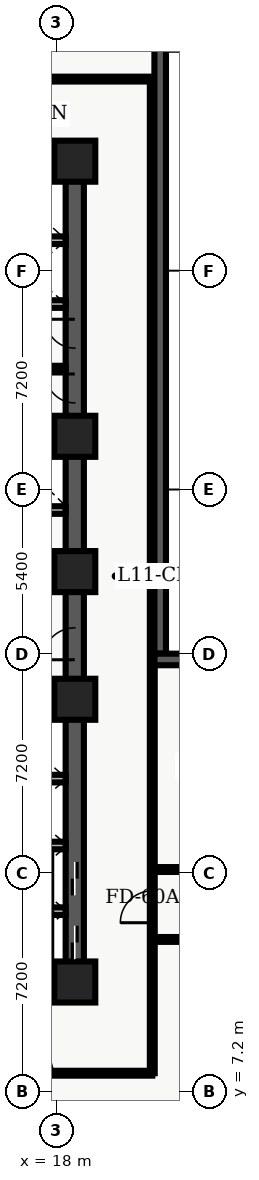
"""IFC4 building model, lengths in metres.
Left out: names, types, materials, properties, quantities, classifications, styles, units other than length and angle.
Written with IfcOpenShell. Run it as: python <this file> out.ifc"""

import sys

from ifc_helpers import new_model, entity, si_unit, converted_unit, direction, frame, origin_with_axes, origin_2d_with_axis, place, context, subcontext, project, spatial, polyline, rectangle, outline, extrude, element, fill, save


model = new_model("IFC4")
c1 = context("Model", 3, precision=1e-05, world=origin_with_axes(), true_north=direction((0.0, 1.0)))
c2 = subcontext(c1, "Body", "Model", "MODEL_VIEW")
j1 = project(units=[si_unit("LENGTHUNIT", "METRE"), converted_unit("PLANEANGLEUNIT", "DEGREE", entity("IfcPlaneAngleMeasure", 0.017), si_unit("PLANEANGLEUNIT", "RADIAN"), dimensions=[0, 0, 0, 0, 0, 0, 0])], contexts=[c1])
p1 = place(None, origin_with_axes())
s1 = spatial("IfcSite", under=j1, at=p1, CompositionType="ELEMENT")
p2 = place(p1, origin_with_axes())
s2 = spatial("IfcBuilding", under=s1, at=p2, CompositionType="ELEMENT")
p3 = place(p2, frame((0.0, 0.0, 48.3), z_axis=(0.0, 0.0, 1.0), x_axis=(1.0, 0.0, 0.0)))
s3 = spatial("IfcBuildingStorey", under=s2, at=p3, CompositionType="ELEMENT", Elevation=48.3)
p4 = place(p3, frame((11.4, 10.8, 0.0), z_axis=(0.0, 0.0, 1.0), x_axis=(1.0, 0.0, 0.0)))
e1 = element("IfcWall", 1, at=p4, inside=s3, PredefinedType="SHEAR", context=c2, shape_type="SweptSolid", body=[
    extrude(outline(polyline([(0.0, -0.3), (7.2, -0.3), (7.2, 0.3), (0.0, 0.3), (0.0, -0.3)])), origin_with_axes(), (0.0, 0.0, 1.0), 3.66),
])
p5 = place(p4, frame((2.625, 0.0, 0.0), z_axis=(0.0, 0.0, 1.0), x_axis=(1.0, 0.0, 0.0)))
e2 = element("IfcOpeningElement", 2, at=p5, cuts=e1, PredefinedType="OPENING", context=c2, shape_type="SweptSolid", body=[
    extrude(rectangle(XDim=1.05, YDim=0.62, at=origin_2d_with_axis()), origin_with_axes(), (0.0, 0.0, 1.0), 2.15),
])
p6 = place(p3, frame((11.4, 37.8, 0.0), z_axis=(0.0, 0.0, 1.0), x_axis=(1.0, 0.0, 0.0)))
e3 = element("IfcWall", 3, at=p6, inside=s3, PredefinedType="SHEAR", context=c2, shape_type="SweptSolid", body=[
    extrude(outline(polyline([(0.0, -0.3), (7.2, -0.3), (7.2, 0.3), (0.0, 0.3), (0.0, -0.3)])), origin_with_axes(), (0.0, 0.0, 1.0), 3.66),
])
p7 = place(p6, frame((2.625, 0.0, 0.0), z_axis=(0.0, 0.0, 1.0), x_axis=(1.0, 0.0, 0.0)))
e4 = element("IfcOpeningElement", 4, at=p7, cuts=e3, PredefinedType="OPENING", context=c2, shape_type="SweptSolid", body=[
    extrude(rectangle(XDim=1.05, YDim=0.62, at=origin_2d_with_axis()), origin_with_axes(), (0.0, 0.0, 1.0), 2.15),
])
p8 = place(p3, frame((18.6, 10.8, 0.0), z_axis=(0.0, 0.0, 1.0), x_axis=(0.0, 1.0, 0.0)))
e5 = element("IfcWall", 5, at=p8, inside=s3, PredefinedType="SHEAR", context=c2, shape_type="SweptSolid", body=[
    extrude(outline(polyline([(0.0, -0.3), (13.5, -0.3), (13.5, 0.3), (0.0, 0.3), (0.0, -0.3)])), origin_with_axes(), (0.0, 0.0, 1.0), 3.66),
])
p9 = place(p8, frame((1.3, 0.0, 0.0), z_axis=(0.0, 0.0, 1.0), x_axis=(1.0, 0.0, 0.0)))
e6 = element("IfcOpeningElement", 6, at=p9, cuts=e5, PredefinedType="OPENING", context=c2, shape_type="SweptSolid", body=[
    extrude(rectangle(XDim=1.1, YDim=0.62, at=origin_2d_with_axis()), origin_with_axes(), (0.0, 0.0, 1.0), 2.15),
])
p10 = place(p8, frame((3.4, 0.0, 0.0), z_axis=(0.0, 0.0, 1.0), x_axis=(1.0, 0.0, 0.0)))
e7 = element("IfcOpeningElement", 7, at=p10, cuts=e5, PredefinedType="OPENING", context=c2, shape_type="SweptSolid", body=[
    extrude(rectangle(XDim=1.1, YDim=0.62, at=origin_2d_with_axis()), origin_with_axes(), (0.0, 0.0, 1.0), 2.15),
])
p11 = place(p8, frame((11.125, 0.0, 0.0), z_axis=(0.0, 0.0, 1.0), x_axis=(1.0, 0.0, 0.0)))
e8 = element("IfcOpeningElement", 8, at=p11, cuts=e5, PredefinedType="OPENING", context=c2, shape_type="SweptSolid", body=[
    extrude(rectangle(XDim=1.05, YDim=0.62, at=origin_2d_with_axis()), origin_with_axes(), (0.0, 0.0, 1.0), 2.15),
])
p12 = place(p3, frame((18.6, 24.3, 0.0), z_axis=(0.0, 0.0, 1.0), x_axis=(0.0, 1.0, 0.0)))
e9 = element("IfcWall", 9, at=p12, inside=s3, PredefinedType="SHEAR", context=c2, shape_type="SweptSolid", body=[
    extrude(outline(polyline([(0.0, -0.3), (13.5, -0.3), (13.5, 0.3), (0.0, 0.3), (0.0, -0.3)])), origin_with_axes(), (0.0, 0.0, 1.0), 3.66),
])
p13 = place(p12, frame((6.025, 0.0, 0.0), z_axis=(0.0, 0.0, 1.0), x_axis=(1.0, 0.0, 0.0)))
e10 = element("IfcOpeningElement", 10, at=p13, cuts=e9, PredefinedType="OPENING", context=c2, shape_type="SweptSolid", body=[
    extrude(rectangle(XDim=0.95, YDim=0.62, at=origin_2d_with_axis()), origin_with_axes(), (0.0, 0.0, 1.0), 2.15),
])
p14 = place(p12, frame((7.825, 0.0, 0.0), z_axis=(0.0, 0.0, 1.0), x_axis=(1.0, 0.0, 0.0)))
e11 = element("IfcOpeningElement", 11, at=p14, cuts=e9, PredefinedType="OPENING", context=c2, shape_type="SweptSolid", body=[
    extrude(rectangle(XDim=0.95, YDim=0.62, at=origin_2d_with_axis()), origin_with_axes(), (0.0, 0.0, 1.0), 2.15),
])
for number, where, z_axis, x_axis in (
    (12, (11.7, 19.825, 0.0), (0.0, 0.0, 1.0), (1.0, 0.0, 0.0)),
    (13, (11.7, 28.775, 0.0), (0.0, 0.0, 1.0), (1.0, 0.0, 0.0)),
):
    element("IfcWall", number, at=place(p3, frame(where, z_axis=z_axis, x_axis=x_axis)), inside=s3, PredefinedType="SHEAR", context=c2, shape_type="SweptSolid", body=[
        extrude(outline(polyline([(0.0, -0.125), (6.6, -0.125), (6.6, 0.125), (0.0, 0.125), (0.0, -0.125)])), origin_with_axes(), (0.0, 0.0, 1.0), 3.66),
    ])
p15 = place(p3, frame((11.7, 24.1, 0.0), z_axis=(0.0, 0.0, 1.0), x_axis=(1.0, 0.0, 0.0)))
e14 = element("IfcWall", 14, at=p15, inside=s3, PredefinedType="SOLIDWALL", context=c2, shape_type="SweptSolid", body=[
    extrude(outline(polyline([(0.0, -0.125), (6.6, -0.125), (6.6, 0.125), (0.0, 0.125), (0.0, -0.125)])), origin_with_axes(), (0.0, 0.0, 1.0), 2.7),
])
p16 = place(p15, frame((3.6, 0.0, 0.0), z_axis=(0.0, 0.0, 1.0), x_axis=(1.0, 0.0, 0.0)))
e15 = element("IfcOpeningElement", 15, at=p16, cuts=e14, PredefinedType="OPENING", context=c2, shape_type="SweptSolid", body=[
    extrude(rectangle(XDim=0.9, YDim=0.27, at=origin_2d_with_axis()), origin_with_axes(), (0.0, 0.0, 1.0), 2.15),
])
p17 = place(p15, frame((5.65, 0.0, 0.0), z_axis=(0.0, 0.0, 1.0), x_axis=(1.0, 0.0, 0.0)))
e16 = element("IfcOpeningElement", 16, at=p17, cuts=e14, PredefinedType="OPENING", context=c2, shape_type="SweptSolid", body=[
    extrude(rectangle(XDim=0.9, YDim=0.27, at=origin_2d_with_axis()), origin_with_axes(), (0.0, 0.0, 1.0), 2.15),
])
p18 = place(p3, frame((11.7, 26.325, 0.0), z_axis=(0.0, 0.0, 1.0), x_axis=(1.0, 0.0, 0.0)))
e17 = element("IfcWall", 17, at=p18, inside=s3, PredefinedType="SOLIDWALL", context=c2, shape_type="SweptSolid", body=[
    extrude(outline(polyline([(0.0, -0.125), (6.6, -0.125), (6.6, 0.125), (0.0, 0.125), (0.0, -0.125)])), origin_with_axes(), (0.0, 0.0, 1.0), 2.7),
])
p19 = place(p18, frame((3.5, 0.0, 0.0), z_axis=(0.0, 0.0, 1.0), x_axis=(1.0, 0.0, 0.0)))
e18 = element("IfcOpeningElement", 18, at=p19, cuts=e17, PredefinedType="OPENING", context=c2, shape_type="SweptSolid", body=[
    extrude(rectangle(XDim=0.9, YDim=0.27, at=origin_2d_with_axis()), origin_with_axes(), (0.0, 0.0, 1.0), 2.15),
])
for number, where, z_axis, x_axis in (
    (19, (18.6, 10.8, 0.0), (0.0, 0.0, 1.0), (1.0, 0.0, 0.0)),
    (20, (18.6, 20.1, 0.0), (0.0, 0.0, 1.0), (1.0, 0.0, 0.0)),
    (21, (18.6, 24.3, 0.0), (0.0, 0.0, 1.0), (1.0, 0.0, 0.0)),
    (22, (18.6, 28.75, 0.0), (0.0, 0.0, 1.0), (1.0, 0.0, 0.0)),
    (23, (18.6, 37.8, 0.0), (0.0, 0.0, 1.0), (1.0, 0.0, 0.0)),
):
    element("IfcColumn", number, at=place(p3, frame(where, z_axis=z_axis, x_axis=x_axis)), inside=s3, PredefinedType="COLUMN", context=c2, shape_type="SweptSolid", body=[
        extrude(rectangle(XDim=1.35, YDim=1.35, at=origin_2d_with_axis()), origin_with_axes(), (0.0, 0.0, 1.0), 3.9),
    ])
for number, where, z_axis, x_axis in (
    (24, (15.84, 13.13, 0.0), (0.0, 0.0, 1.0), (1.0, 0.0, 0.0)),
    (25, (15.84, 15.29, 0.0), (0.0, 0.0, 1.0), (1.0, 0.0, 0.0)),
    (26, (15.84, 17.49, 0.0), (0.0, 0.0, 1.0), (1.0, 0.0, 0.0)),
    (27, (15.84, 33.1, 0.0), (0.0, 0.0, 1.0), (1.0, 0.0, 0.0)),
    (28, (15.84, 35.2, 0.0), (0.0, 0.0, 1.0), (1.0, 0.0, 0.0)),
):
    element("IfcWall", number, at=place(p3, frame(where, z_axis=z_axis, x_axis=x_axis)), inside=s3, PredefinedType="SOLIDWALL", context=c2, shape_type="SweptSolid", body=[
        extrude(outline(polyline([(0.0, -0.125), (2.46, -0.125), (2.46, 0.125), (0.0, 0.125), (0.0, -0.125)])), origin_with_axes(), (0.0, 0.0, 1.0), 2.7),
    ])
p20 = place(p3, frame((15.84, 31.0, 0.0), z_axis=(0.0, 0.0, 1.0), x_axis=(1.0, 0.0, 0.0)))
e29 = element("IfcWall", 29, at=p20, inside=s3, PredefinedType="PARTITIONING", context=c2, shape_type="SweptSolid", body=[
    extrude(outline(polyline([(0.0, -0.07), (2.46, -0.07), (2.46, 0.07), (0.0, 0.07), (0.0, -0.07)])), origin_with_axes(), (0.0, 0.0, 1.0), 2.7),
])
p21 = place(p3, frame((2.6, 7.8, 0.0), z_axis=(0.0, 0.0, 1.0), x_axis=(1.0, 0.0, 0.0)))
e30 = element("IfcWall", 30, at=p21, inside=s3, PredefinedType="PARTITIONING", context=c2, shape_type="SweptSolid", body=[
    extrude(outline(polyline([(0.0, -0.08), (18.55, -0.08), (18.55, 0.08), (0.0, 0.08), (0.0, -0.08)])), origin_with_axes(), (0.0, 0.0, 1.0), 2.7),
])
p22 = place(p21, frame((2.225, 0.0, 0.0), z_axis=(0.0, 0.0, 1.0), x_axis=(1.0, 0.0, 0.0)))
e31 = element("IfcOpeningElement", 31, at=p22, cuts=e30, PredefinedType="OPENING", context=c2, shape_type="SweptSolid", body=[
    extrude(rectangle(XDim=1.0, YDim=0.18, at=origin_2d_with_axis()), origin_with_axes(), (0.0, 0.0, 1.0), 2.15),
])
p23 = place(p21, frame((8.043, 0.0, 0.0), z_axis=(0.0, 0.0, 1.0), x_axis=(1.0, 0.0, 0.0)))
e32 = element("IfcOpeningElement", 32, at=p23, cuts=e30, PredefinedType="OPENING", context=c2, shape_type="SweptSolid", body=[
    extrude(rectangle(XDim=1.0, YDim=0.18, at=origin_2d_with_axis()), origin_with_axes(), (0.0, 0.0, 1.0), 2.15),
])
p24 = place(p21, frame((14.784, 0.0, 0.0), z_axis=(0.0, 0.0, 1.0), x_axis=(1.0, 0.0, 0.0)))
e33 = element("IfcOpeningElement", 33, at=p24, cuts=e30, PredefinedType="OPENING", context=c2, shape_type="SweptSolid", body=[
    extrude(rectangle(XDim=1.0, YDim=0.18, at=origin_2d_with_axis()), origin_with_axes(), (0.0, 0.0, 1.0), 2.15),
])
p25 = place(p3, frame((2.6, 40.5, 0.0), z_axis=(0.0, 0.0, 1.0), x_axis=(1.0, 0.0, 0.0)))
e34 = element("IfcWall", 34, at=p25, inside=s3, PredefinedType="PARTITIONING", context=c2, shape_type="SweptSolid", body=[
    extrude(outline(polyline([(0.0, -0.08), (18.65, -0.08), (18.65, 0.08), (0.0, 0.08), (0.0, -0.08)])), origin_with_axes(), (0.0, 0.0, 1.0), 2.7),
])
p26 = place(p25, frame((5.275, 0.0, 0.0), z_axis=(0.0, 0.0, 1.0), x_axis=(1.0, 0.0, 0.0)))
e35 = element("IfcOpeningElement", 35, at=p26, cuts=e34, PredefinedType="OPENING", context=c2, shape_type="SweptSolid", body=[
    extrude(rectangle(XDim=1.0, YDim=0.18, at=origin_2d_with_axis()), origin_with_axes(), (0.0, 0.0, 1.0), 2.15),
])
p27 = place(p25, frame((12.61, 0.0, 0.0), z_axis=(0.0, 0.0, 1.0), x_axis=(1.0, 0.0, 0.0)))
e36 = element("IfcOpeningElement", 36, at=p27, cuts=e34, PredefinedType="OPENING", context=c2, shape_type="SweptSolid", body=[
    extrude(rectangle(XDim=1.2, YDim=0.18, at=origin_2d_with_axis()), origin_with_axes(), (0.0, 0.0, 1.0), 2.2),
])
p28 = place(p3, frame((21.15, 7.8, 0.0), z_axis=(0.0, 0.0, 1.0), x_axis=(0.0, 1.0, 0.0)))
e37 = element("IfcWall", 37, at=p28, inside=s3, PredefinedType="PARTITIONING", context=c2, shape_type="SweptSolid", body=[
    extrude(outline(polyline([(0.0, -0.08), (32.7, -0.08), (32.7, 0.08), (0.0, 0.08), (0.0, -0.08)])), origin_with_axes(), (0.0, 0.0, 1.0), 2.7),
])
p29 = place(p28, frame((5.475, 0.0, 0.0), z_axis=(0.0, 0.0, 1.0), x_axis=(1.0, 0.0, 0.0)))
e38 = element("IfcOpeningElement", 38, at=p29, cuts=e37, PredefinedType="OPENING", context=c2, shape_type="SweptSolid", body=[
    extrude(rectangle(XDim=1.05, YDim=0.18, at=origin_2d_with_axis()), origin_with_axes(), (0.0, 0.0, 1.0), 2.15),
])
p30 = place(p3, frame((21.15, 12.2, 0.0), z_axis=(0.0, 0.0, 1.0), x_axis=(1.0, 0.0, 0.0)))
e39 = element("IfcWall", 39, at=p30, inside=s3, PredefinedType="PARTITIONING", context=c2, shape_type="SweptSolid", body=[
    extrude(outline(polyline([(0.0, -0.08), (15.2, -0.08), (15.2, 0.08), (0.0, 0.08), (0.0, -0.08)])), origin_with_axes(), (0.0, 0.0, 1.0), 2.7),
])
p31 = place(p30, frame((3.477, 0.0, 0.0), z_axis=(0.0, 0.0, 1.0), x_axis=(1.0, 0.0, 0.0)))
e40 = element("IfcOpeningElement", 40, at=p31, cuts=e39, PredefinedType="OPENING", context=c2, shape_type="SweptSolid", body=[
    extrude(rectangle(XDim=1.0, YDim=0.18, at=origin_2d_with_axis()), origin_with_axes(), (0.0, 0.0, 1.0), 2.15),
])
p32 = place(p30, frame((10.947, 0.0, 0.0), z_axis=(0.0, 0.0, 1.0), x_axis=(1.0, 0.0, 0.0)))
e41 = element("IfcOpeningElement", 41, at=p32, cuts=e39, PredefinedType="OPENING", context=c2, shape_type="SweptSolid", body=[
    extrude(rectangle(XDim=1.0, YDim=0.18, at=origin_2d_with_axis()), origin_with_axes(), (0.0, 0.0, 1.0), 2.15),
])
p33 = place(p3, frame((21.15, 14.5, 0.0), z_axis=(0.0, 0.0, 1.0), x_axis=(1.0, 0.0, 0.0)))
e42 = element("IfcWall", 42, at=p33, inside=s3, PredefinedType="PARTITIONING", context=c2, shape_type="SweptSolid", body=[
    extrude(outline(polyline([(0.0, -0.08), (15.2, -0.08), (15.2, 0.08), (0.0, 0.08), (0.0, -0.08)])), origin_with_axes(), (0.0, 0.0, 1.0), 2.7),
])
p34 = place(p33, frame((2.303, 0.0, 0.0), z_axis=(0.0, 0.0, 1.0), x_axis=(1.0, 0.0, 0.0)))
e43 = element("IfcOpeningElement", 43, at=p34, cuts=e42, PredefinedType="OPENING", context=c2, shape_type="SweptSolid", body=[
    extrude(rectangle(XDim=1.0, YDim=0.18, at=origin_2d_with_axis()), origin_with_axes(), (0.0, 0.0, 1.0), 2.15),
])
p35 = place(p33, frame((6.851, 0.0, 0.0), z_axis=(0.0, 0.0, 1.0), x_axis=(1.0, 0.0, 0.0)))
e44 = element("IfcOpeningElement", 44, at=p35, cuts=e42, PredefinedType="OPENING", context=c2, shape_type="SweptSolid", body=[
    extrude(rectangle(XDim=1.2, YDim=0.18, at=origin_2d_with_axis()), origin_with_axes(), (0.0, 0.0, 1.0), 2.2),
])
p36 = place(p33, frame((12.198, 0.0, 0.0), z_axis=(0.0, 0.0, 1.0), x_axis=(1.0, 0.0, 0.0)))
e45 = element("IfcOpeningElement", 45, at=p36, cuts=e42, PredefinedType="OPENING", context=c2, shape_type="SweptSolid", body=[
    extrude(rectangle(XDim=1.0, YDim=0.18, at=origin_2d_with_axis()), origin_with_axes(), (0.0, 0.0, 1.0), 2.15),
])
p37 = place(p3, frame((21.41, 45.82, 0.0), z_axis=(0.0, 0.0, 1.0), x_axis=(0.0, -1.0, 0.0)))
e46 = element("IfcWall", 46, at=p37, inside=s3, PredefinedType="SOLIDWALL", context=c2, shape_type="SweptSolid", body=[
    extrude(outline(polyline([(0.0, -0.19), (24.22, -0.19), (24.22, 0.19), (0.0, 0.19), (0.0, -0.19)])), origin_with_axes(), (0.0, 0.0, 1.0), 3.66),
])
p38 = place(p37, frame((2.902, 0.0, 0.45), z_axis=(0.0, 0.0, 1.0), x_axis=(1.0, 0.0, 0.0)))
e47 = element("IfcOpeningElement", 47, at=p38, cuts=e46, PredefinedType="OPENING", context=c2, shape_type="SweptSolid", body=[
    extrude(rectangle(XDim=2.1, YDim=0.4, at=origin_2d_with_axis()), origin_with_axes(), (0.0, 0.0, 1.0), 2.2),
])
p39 = place(p3, frame((21.22, 21.41, 0.0), z_axis=(0.0, 0.0, 1.0), x_axis=(1.0, 0.0, 0.0)))
e48 = element("IfcWall", 48, at=p39, inside=s3, PredefinedType="SOLIDWALL", context=c2, shape_type="SweptSolid", body=[
    extrude(outline(polyline([(0.0, -0.19), (17.18, -0.19), (17.18, 0.19), (0.0, 0.19), (0.0, -0.19)])), origin_with_axes(), (0.0, 0.0, 1.0), 3.66),
])
p40 = place(p39, frame((2.413, 0.0, 0.45), z_axis=(0.0, 0.0, 1.0), x_axis=(1.0, 0.0, 0.0)))
e49 = element("IfcOpeningElement", 49, at=p40, cuts=e48, PredefinedType="OPENING", context=c2, shape_type="SweptSolid", body=[
    extrude(rectangle(XDim=2.1, YDim=0.4, at=origin_2d_with_axis()), origin_with_axes(), (0.0, 0.0, 1.0), 2.2),
])
p41 = place(p39, frame((13.467, 0.0, 0.45), z_axis=(0.0, 0.0, 1.0), x_axis=(1.0, 0.0, 0.0)))
e50 = element("IfcOpeningElement", 50, at=p41, cuts=e48, PredefinedType="OPENING", context=c2, shape_type="SweptSolid", body=[
    extrude(rectangle(XDim=2.1, YDim=0.4, at=origin_2d_with_axis()), origin_with_axes(), (0.0, 0.0, 1.0), 2.2),
])
p42 = place(p8, frame((1.3, 0.0, 0.0), z_axis=(0.0, 0.0, 1.0), x_axis=(1.0, 0.0, 0.0)))
e51 = element("IfcDoor", 51, at=p42, inside=s3, OperationType="SLIDING_TO_LEFT", PredefinedType="DOOR", context=c2, shape_type="SweptSolid", body=[
    extrude(rectangle(XDim=1.1, YDim=0.09, at=origin_2d_with_axis()), origin_with_axes(), (0.0, 0.0, 1.0), 2.15),
])
fill(e6, e51)
p43 = place(p8, frame((3.4, 0.0, 0.0), z_axis=(0.0, 0.0, 1.0), x_axis=(1.0, 0.0, 0.0)))
e52 = element("IfcDoor", 52, at=p43, inside=s3, OperationType="SLIDING_TO_RIGHT", PredefinedType="DOOR", context=c2, shape_type="SweptSolid", body=[
    extrude(rectangle(XDim=1.1, YDim=0.09, at=origin_2d_with_axis()), origin_with_axes(), (0.0, 0.0, 1.0), 2.15),
])
fill(e7, e52)
p44 = place(p8, frame((11.125, 0.0, 0.0), z_axis=(0.0, 0.0, 1.0), x_axis=(1.0, 0.0, 0.0)))
e53 = element("IfcDoor", 53, at=p44, inside=s3, OperationType="SINGLE_SWING_LEFT", PredefinedType="DOOR", context=c2, shape_type="SweptSolid", body=[
    extrude(rectangle(XDim=1.05, YDim=0.09, at=origin_2d_with_axis()), origin_with_axes(), (0.0, 0.0, 1.0), 2.15),
])
fill(e8, e53)
p45 = place(p12, frame((6.025, 0.0, 0.0), z_axis=(0.0, 0.0, 1.0), x_axis=(1.0, 0.0, 0.0)))
e54 = element("IfcDoor", 54, at=p45, inside=s3, OperationType="SINGLE_SWING_RIGHT", PredefinedType="DOOR", context=c2, shape_type="SweptSolid", body=[
    extrude(rectangle(XDim=0.95, YDim=0.09, at=origin_2d_with_axis()), origin_with_axes(), (0.0, 0.0, 1.0), 2.15),
])
fill(e10, e54)
p46 = place(p12, frame((7.825, 0.0, 0.0), z_axis=(0.0, 0.0, 1.0), x_axis=(1.0, 0.0, 0.0)))
e55 = element("IfcDoor", 55, at=p46, inside=s3, OperationType="SINGLE_SWING_RIGHT", PredefinedType="DOOR", context=c2, shape_type="SweptSolid", body=[
    extrude(rectangle(XDim=0.95, YDim=0.09, at=origin_2d_with_axis()), origin_with_axes(), (0.0, 0.0, 1.0), 2.15),
])
fill(e11, e55)
p47 = place(p21, frame((14.784, 0.0, 0.0), z_axis=(0.0, 0.0, 1.0), x_axis=(1.0, 0.0, 0.0)))
e56 = element("IfcDoor", 56, at=p47, inside=s3, OperationType="SINGLE_SWING_LEFT", PredefinedType="DOOR", context=c2, shape_type="SweptSolid", body=[
    extrude(rectangle(XDim=1.0, YDim=0.09, at=origin_2d_with_axis()), origin_with_axes(), (0.0, 0.0, 1.0), 2.15),
])
fill(e33, e56)
p48 = place(p28, frame((5.475, 0.0, 0.0), z_axis=(0.0, 0.0, 1.0), x_axis=(1.0, 0.0, 0.0)))
e57 = element("IfcDoor", 57, at=p48, inside=s3, OperationType="SINGLE_SWING_LEFT", PredefinedType="DOOR", context=c2, shape_type="SweptSolid", body=[
    extrude(rectangle(XDim=1.05, YDim=0.09, at=origin_2d_with_axis()), origin_with_axes(), (0.0, 0.0, 1.0), 2.15),
])
fill(e38, e57)
save(model, sys.argv[1])
